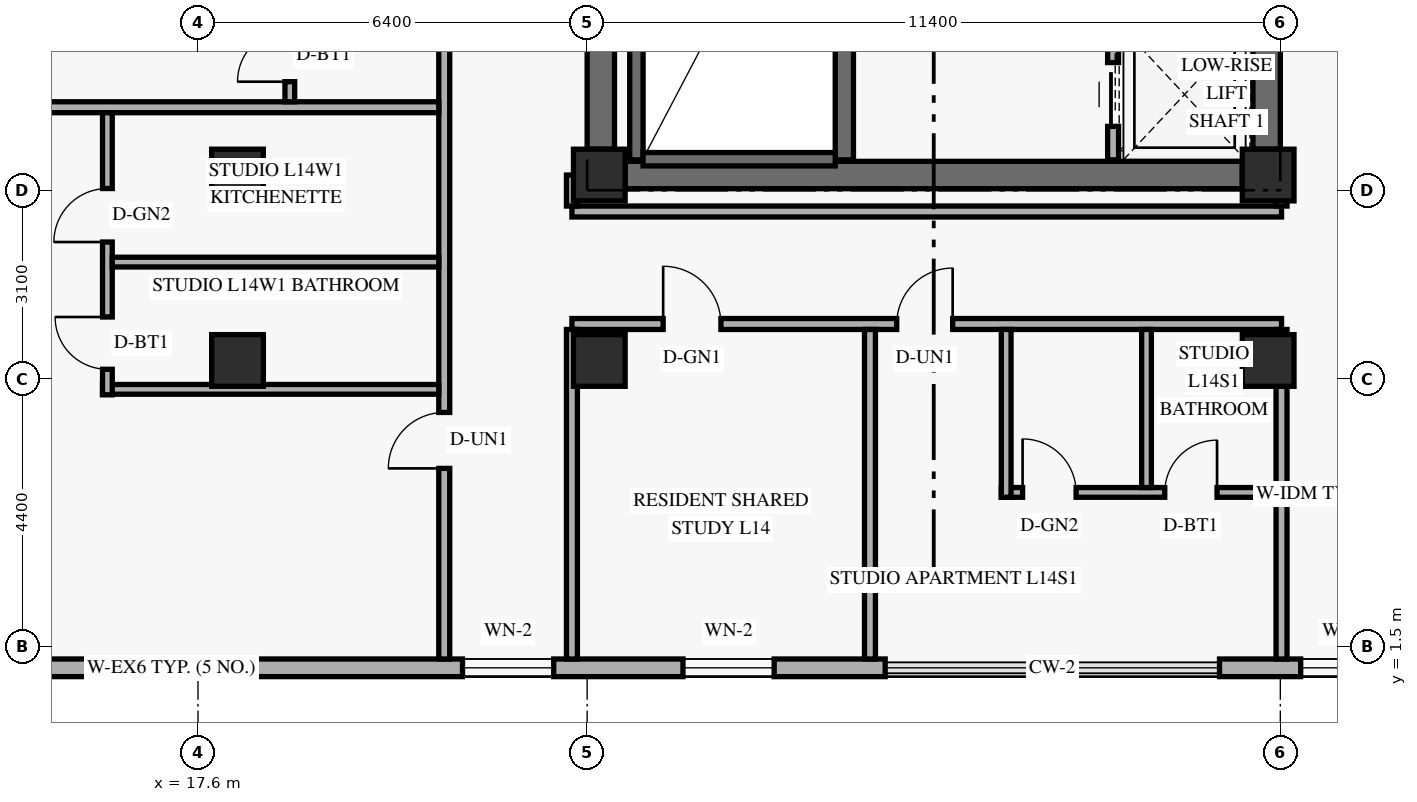
"""IFC4 building model, lengths in metres.
Left out: names, types, materials, properties, quantities, classifications, styles, units other than length and angle.
Written with IfcOpenShell. Run it as: python <this file> out.ifc"""

import sys

from ifc_helpers import new_model, si_unit, direction, frame, frame_2d, origin, origin_2d, place, context, subcontext, project, spatial, rectangle, extrude, element, fill, save


model = new_model("IFC4")
c1 = context("Model", 3, precision=1e-05, world=origin(), true_north=direction((0.0, 1.0)))
c2 = subcontext(c1, "Body", "Model", "MODEL_VIEW")
j1 = project(units=[si_unit("LENGTHUNIT", "METRE"), si_unit("PLANEANGLEUNIT", "RADIAN")], contexts=[c1])
p1 = place(None, origin())
s1 = spatial("IfcSite", under=j1, at=p1, CompositionType="ELEMENT")
p2 = place(p1, origin())
s2 = spatial("IfcBuilding", under=s1, at=p2, CompositionType="ELEMENT")
p3 = place(p2, frame((0.0, 0.0, 56.4)))
s3 = spatial("IfcBuildingStorey", under=s2, at=p3, CompositionType="ELEMENT", Elevation=56.4)
p4 = place(p3, frame((24.225, 9.675, 0.0), z_axis=(0.0, 0.0, 1.0), x_axis=(0.0, 1.0, 0.0)))
e1 = element("IfcWall", 1, at=p4, inside=s3, PredefinedType="SHEAR", context=c2, shape_type="SweptSolid", body=[
    extrude(rectangle(XDim=7.45, YDim=0.45, at=frame_2d((3.725, 0.0))), origin(), (0.0, 0.0, 1.0), 2.657),
])
p5 = place(p3, frame((35.175, 9.675, 0.0), z_axis=(0.0, 0.0, 1.0), x_axis=(0.0, 1.0, 0.0)))
e2 = element("IfcWall", 2, at=p5, inside=s3, PredefinedType="SHEAR", context=c2, shape_type="SweptSolid", body=[
    extrude(rectangle(XDim=5.875, YDim=0.45, at=frame_2d((2.938, 0.0))), origin(), (0.0, 0.0, 1.0), 2.657),
])
p6 = place(p3, frame((24.625, 9.25, 0.0), z_axis=(0.0, 0.0, 1.0), x_axis=(1.0, 0.0, 0.0)))
e3 = element("IfcWall", 3, at=p6, inside=s3, PredefinedType="SHEAR", context=c2, shape_type="SweptSolid", body=[
    extrude(rectangle(XDim=10.15, YDim=0.45, at=frame_2d((5.075, 0.0))), origin(), (0.0, 0.0, 1.0), 3.35),
])
p7 = place(p3, frame((24.81, 9.5, 0.0), z_axis=(0.0, 0.0, 1.0), x_axis=(0.0, 1.0, 0.0)))
e4 = element("IfcWall", 4, at=p7, inside=s3, PredefinedType="SHEAR", context=c2, shape_type="SweptSolid", body=[
    extrude(rectangle(XDim=7.76, YDim=0.22, at=frame_2d((3.88, 0.0))), origin(), (0.0, 0.0, 1.0), 3.35),
])
p8 = place(p3, frame((28.23, 9.5, 0.0), z_axis=(0.0, 0.0, 1.0), x_axis=(0.0, 1.0, 0.0)))
e5 = element("IfcWall", 5, at=p8, inside=s3, PredefinedType="SHEAR", context=c2, shape_type="SweptSolid", body=[
    extrude(rectangle(XDim=7.76, YDim=0.3, at=frame_2d((3.88, 0.0))), origin(), (0.0, 0.0, 1.0), 3.35),
])
p9 = place(p3, frame((24.92, 9.51, 0.0), z_axis=(0.0, 0.0, 1.0), x_axis=(1.0, 0.0, 0.0)))
e6 = element("IfcWall", 6, at=p9, inside=s3, PredefinedType="SHEAR", context=c2, shape_type="SweptSolid", body=[
    extrude(rectangle(XDim=3.16, YDim=0.22, at=frame_2d((1.58, 0.0))), origin(), (0.0, 0.0, 1.0), 3.35),
])
for number, where, z_axis, x_axis in (
    (7, (18.25, 6.2, 0.0), (0.0, 0.0, 1.0), (1.0, 0.0, 0.0)),
    (8, (18.25, 9.25, 0.0), (0.0, 0.0, 1.0), (1.0, 0.0, 0.0)),
    (9, (24.2, 6.2, 0.0), (0.0, 0.0, 1.0), (1.0, 0.0, 0.0)),
    (10, (24.2, 9.25, 0.0), (0.0, 0.0, 1.0), (1.0, 0.0, 0.0)),
    (11, (35.2, 6.2, 0.0), (0.0, 0.0, 1.0), (1.0, 0.0, 0.0)),
    (12, (35.2, 9.25, 0.0), (0.0, 0.0, 1.0), (1.0, 0.0, 0.0)),
):
    element("IfcColumn", number, at=place(p3, frame(where, z_axis=z_axis, x_axis=x_axis)), inside=s3, PredefinedType="COLUMN", context=c2, shape_type="SweptSolid", body=[
        extrude(rectangle(XDim=0.85, YDim=0.85, at=origin_2d()), origin(), (0.0, 0.0, 1.0), 3.6),
    ])
p10 = place(p3, frame((5.42, 1.145, 0.0), z_axis=(0.0, 0.0, 1.0), x_axis=(1.0, 0.0, 0.0)))
e13 = element("IfcWall", 13, at=p10, inside=s3, PredefinedType="SOLIDWALL", context=c2, shape_type="SweptSolid", body=[
    extrude(rectangle(XDim=23.481, YDim=0.29, at=frame_2d((11.741, 0.0))), origin(), (0.0, 0.0, 1.0), 3.35),
])
p11 = place(p10, frame((7.365, 0.0, 0.85)))
e14 = element("IfcOpeningElement", 14, at=p11, cuts=e13, PredefinedType="OPENING", context=c2, shape_type="SweptSolid", body=[
    extrude(rectangle(XDim=1.5, YDim=1.55, at=frame_2d((0.75, 0.775))), frame((0.0, 0.155, 0.0), z_axis=(0.0, -1.0, 0.0), x_axis=(1.0, 0.0, 0.0)), (0.0, 0.0, 1.0), 0.31),
])
p12 = place(p10, frame((16.53, 0.0, 0.85)))
e15 = element("IfcOpeningElement", 15, at=p12, cuts=e13, PredefinedType="OPENING", context=c2, shape_type="SweptSolid", body=[
    extrude(rectangle(XDim=1.5, YDim=1.55, at=frame_2d((0.75, 0.775))), frame((0.0, 0.155, 0.0), z_axis=(0.0, -1.0, 0.0), x_axis=(1.0, 0.0, 0.0)), (0.0, 0.0, 1.0), 0.31),
])
p13 = place(p10, frame((20.156, 0.0, 0.85)))
e16 = element("IfcOpeningElement", 16, at=p13, cuts=e13, PredefinedType="OPENING", context=c2, shape_type="SweptSolid", body=[
    extrude(rectangle(XDim=1.5, YDim=1.55, at=frame_2d((0.75, 0.775))), frame((0.0, 0.155, 0.0), z_axis=(0.0, -1.0, 0.0), x_axis=(1.0, 0.0, 0.0)), (0.0, 0.0, 1.0), 0.31),
])
p14 = place(p3, frame((34.4, 1.145, 0.0), z_axis=(0.0, 0.0, 1.0), x_axis=(1.0, 0.0, 0.0)))
e17 = element("IfcWall", 17, at=p14, inside=s3, PredefinedType="SOLIDWALL", context=c2, shape_type="SweptSolid", body=[
    extrude(rectangle(XDim=10.58, YDim=0.29, at=frame_2d((5.29, 0.0))), origin(), (0.0, 0.0, 1.0), 3.35),
])
p15 = place(p14, frame((1.335, 0.0, 0.85)))
e18 = element("IfcOpeningElement", 18, at=p15, cuts=e17, PredefinedType="OPENING", context=c2, shape_type="SweptSolid", body=[
    extrude(rectangle(XDim=1.5, YDim=1.55, at=frame_2d((0.75, 0.775))), frame((0.0, 0.155, 0.0), z_axis=(0.0, -1.0, 0.0), x_axis=(1.0, 0.0, 0.0)), (0.0, 0.0, 1.0), 0.31),
])
p16 = place(p14, frame((6.115, 0.0, 0.85)))
e19 = element("IfcOpeningElement", 19, at=p16, cuts=e17, PredefinedType="OPENING", context=c2, shape_type="SweptSolid", body=[
    extrude(rectangle(XDim=1.5, YDim=1.55, at=frame_2d((0.75, 0.775))), frame((0.0, 0.155, 0.0), z_axis=(0.0, -1.0, 0.0), x_axis=(1.0, 0.0, 0.0)), (0.0, 0.0, 1.0), 0.31),
])
p17 = place(p3, frame((32.65, 9.5, 0.0), z_axis=(0.0, 0.0, 1.0), x_axis=(0.0, 1.0, 0.0)))
e20 = element("IfcWall", 20, at=p17, inside=s3, PredefinedType="STANDARD", context=c2, shape_type="SweptSolid", body=[
    extrude(rectangle(XDim=6.08, YDim=0.18, at=frame_2d((3.04, 0.0))), origin(), (0.0, 0.0, 1.0), 3.35),
])
p18 = place(p17, frame((0.55, 0.0, 0.0)))
e21 = element("IfcOpeningElement", 21, at=p18, cuts=e20, PredefinedType="OPENING", context=c2, shape_type="SweptSolid", body=[
    extrude(rectangle(XDim=1.05, YDim=2.2, at=frame_2d((0.525, 1.1))), frame((0.0, 0.1, 0.0), z_axis=(0.0, -1.0, 0.0), x_axis=(1.0, 0.0, 0.0)), (0.0, 0.0, 1.0), 0.2),
])
p19 = place(p17, frame((2.55, 0.0, 0.0)))
e22 = element("IfcOpeningElement", 22, at=p19, cuts=e20, PredefinedType="OPENING", context=c2, shape_type="SweptSolid", body=[
    extrude(rectangle(XDim=1.05, YDim=2.2, at=frame_2d((0.525, 1.1))), frame((0.0, 0.1, 0.0), z_axis=(0.0, -1.0, 0.0), x_axis=(1.0, 0.0, 0.0)), (0.0, 0.0, 1.0), 0.2),
])
p20 = place(p17, frame((4.55, 0.0, 0.0)))
e23 = element("IfcOpeningElement", 23, at=p20, cuts=e20, PredefinedType="OPENING", context=c2, shape_type="SweptSolid", body=[
    extrude(rectangle(XDim=1.05, YDim=2.2, at=frame_2d((0.525, 1.1))), frame((0.0, 0.1, 0.0), z_axis=(0.0, -1.0, 0.0), x_axis=(1.0, 0.0, 0.0)), (0.0, 0.0, 1.0), 0.2),
])
p21 = place(p3, frame((21.65, 1.29, 0.0), z_axis=(0.0, 0.0, 1.0), x_axis=(0.0, 1.0, 0.0)))
e24 = element("IfcWall", 24, at=p21, inside=s3, PredefinedType="STANDARD", context=c2, shape_type="SweptSolid", body=[
    extrude(rectangle(XDim=45.42, YDim=0.18, at=frame_2d((22.71, 0.0))), origin(), (0.0, 0.0, 1.0), 2.639),
])
p22 = place(p21, frame((3.135, 0.0, 0.0)))
e25 = element("IfcOpeningElement", 25, at=p22, cuts=e24, PredefinedType="OPENING", context=c2, shape_type="SweptSolid", body=[
    extrude(rectangle(XDim=0.92, YDim=2.15, at=frame_2d((0.46, 1.075))), frame((0.0, 0.1, 0.0), z_axis=(0.0, -1.0, 0.0), x_axis=(1.0, 0.0, 0.0)), (0.0, 0.0, 1.0), 0.2),
])
p23 = place(p21, frame((13.975, 0.0, 0.0)))
e26 = element("IfcOpeningElement", 26, at=p23, cuts=e24, PredefinedType="OPENING", context=c2, shape_type="SweptSolid", body=[
    extrude(rectangle(XDim=0.92, YDim=2.15, at=frame_2d((0.46, 1.075))), frame((0.0, 0.1, 0.0), z_axis=(0.0, -1.0, 0.0), x_axis=(1.0, 0.0, 0.0)), (0.0, 0.0, 1.0), 0.2),
])
p24 = place(p21, frame((20.91, 0.0, 0.0)))
e27 = element("IfcOpeningElement", 27, at=p24, cuts=e24, PredefinedType="OPENING", context=c2, shape_type="SweptSolid", body=[
    extrude(rectangle(XDim=0.95, YDim=2.15, at=frame_2d((0.475, 1.075))), frame((0.0, 0.1, 0.0), z_axis=(0.0, -1.0, 0.0), x_axis=(1.0, 0.0, 0.0)), (0.0, 0.0, 1.0), 0.2),
])
p25 = place(p21, frame((32.95, 0.0, 0.0)))
e28 = element("IfcOpeningElement", 28, at=p25, cuts=e24, PredefinedType="OPENING", context=c2, shape_type="SweptSolid", body=[
    extrude(rectangle(XDim=0.92, YDim=2.15, at=frame_2d((0.46, 1.075))), frame((0.0, 0.1, 0.0), z_axis=(0.0, -1.0, 0.0), x_axis=(1.0, 0.0, 0.0)), (0.0, 0.0, 1.0), 0.2),
])
p26 = place(p21, frame((41.85, 0.0, 0.0)))
e29 = element("IfcOpeningElement", 29, at=p26, cuts=e24, PredefinedType="OPENING", context=c2, shape_type="SweptSolid", body=[
    extrude(rectangle(XDim=0.92, YDim=2.15, at=frame_2d((0.46, 1.075))), frame((0.0, 0.1, 0.0), z_axis=(0.0, -1.0, 0.0), x_axis=(1.0, 0.0, 0.0)), (0.0, 0.0, 1.0), 0.2),
])
p27 = place(p3, frame((23.75, 6.8, 0.0), z_axis=(0.0, 0.0, 1.0), x_axis=(1.0, 0.0, 0.0)))
e30 = element("IfcWall", 30, at=p27, inside=s3, PredefinedType="STANDARD", context=c2, shape_type="SweptSolid", body=[
    extrude(rectangle(XDim=11.67, YDim=0.18, at=frame_2d((5.835, 0.0))), origin(), (0.0, 0.0, 1.0), 2.639),
])
p28 = place(p27, frame((1.5, 0.0, 0.0)))
e31 = element("IfcOpeningElement", 31, at=p28, cuts=e30, PredefinedType="OPENING", context=c2, shape_type="SweptSolid", body=[
    extrude(rectangle(XDim=0.95, YDim=2.15, at=frame_2d((0.475, 1.075))), frame((0.0, 0.1, 0.0), z_axis=(0.0, -1.0, 0.0), x_axis=(1.0, 0.0, 0.0)), (0.0, 0.0, 1.0), 0.2),
])
p29 = place(p27, frame((5.341, 0.0, 0.0)))
e32 = element("IfcOpeningElement", 32, at=p29, cuts=e30, PredefinedType="OPENING", context=c2, shape_type="SweptSolid", body=[
    extrude(rectangle(XDim=0.92, YDim=2.15, at=frame_2d((0.46, 1.075))), frame((0.0, 0.1, 0.0), z_axis=(0.0, -1.0, 0.0), x_axis=(1.0, 0.0, 0.0)), (0.0, 0.0, 1.0), 0.2),
])
p30 = place(p3, frame((23.75, 8.65, 0.0), z_axis=(0.0, 0.0, 1.0), x_axis=(1.0, 0.0, 0.0)))
e33 = element("IfcWall", 33, at=p30, inside=s3, PredefinedType="STANDARD", context=c2, shape_type="SweptSolid", body=[
    extrude(rectangle(XDim=11.67, YDim=0.18, at=frame_2d((5.835, 0.0))), origin(), (0.0, 0.0, 1.0), 2.639),
])
p31 = place(p3, frame((35.42, 1.29, 0.0), z_axis=(0.0, 0.0, 1.0), x_axis=(0.0, 1.0, 0.0)))
e34 = element("IfcWall", 34, at=p31, inside=s3, PredefinedType="PARTITIONING", context=c2, shape_type="SweptSolid", body=[
    extrude(rectangle(XDim=5.42, YDim=0.18, at=frame_2d((2.71, 0.0))), origin(), (0.0, 0.0, 1.0), 3.35),
])
p32 = place(p3, frame((35.42, 8.74, 0.0), z_axis=(0.0, 0.0, 1.0), x_axis=(0.0, 1.0, 0.0)))
e35 = element("IfcWall", 35, at=p32, inside=s3, PredefinedType="STANDARD", context=c2, shape_type="SweptSolid", body=[
    extrude(rectangle(XDim=0.51, YDim=0.18, at=frame_2d((0.255, 0.0))), origin(), (0.0, 0.0, 1.0), 3.35),
])
p33 = place(p3, frame((23.75, 8.74, 0.0), z_axis=(0.0, 0.0, 1.0), x_axis=(0.0, 1.0, 0.0)))
e36 = element("IfcWall", 36, at=p33, inside=s3, PredefinedType="STANDARD", context=c2, shape_type="SweptSolid", body=[
    extrude(rectangle(XDim=0.51, YDim=0.18, at=frame_2d((0.255, 0.0))), origin(), (0.0, 0.0, 1.0), 2.639),
])
p34 = place(p3, frame((2.09, 10.365, 0.0), z_axis=(0.0, 0.0, 1.0), x_axis=(1.0, 0.0, 0.0)))
e37 = element("IfcWall", 37, at=p34, inside=s3, PredefinedType="PARTITIONING", context=c2, shape_type="SweptSolid", body=[
    extrude(rectangle(XDim=19.47, YDim=0.18, at=frame_2d((9.735, 0.0))), origin(), (0.0, 0.0, 1.0), 2.639),
])
p35 = place(p3, frame((16.03, 5.725, 0.0), z_axis=(0.0, 0.0, 1.0), x_axis=(1.0, 0.0, 0.0)))
e38 = element("IfcWall", 38, at=p35, inside=s3, PredefinedType="PLUMBINGWALL", context=c2, shape_type="SweptSolid", body=[
    extrude(rectangle(XDim=5.53, YDim=0.16, at=frame_2d((2.765, 0.0))), origin(), (0.0, 0.0, 1.0), 3.35),
])
p36 = place(p3, frame((16.11, 5.635, 0.0), z_axis=(0.0, 0.0, 1.0), x_axis=(0.0, 1.0, 0.0)))
e39 = element("IfcWall", 39, at=p36, inside=s3, PredefinedType="PLUMBINGWALL", context=c2, shape_type="SweptSolid", body=[
    extrude(rectangle(XDim=4.64, YDim=0.16, at=frame_2d((2.32, 0.0))), origin(), (0.0, 0.0, 1.0), 2.639),
])
p37 = place(p36, frame((0.42, 0.0, 0.0)))
e40 = element("IfcOpeningElement", 40, at=p37, cuts=e39, PredefinedType="OPENING", context=c2, shape_type="SweptSolid", body=[
    extrude(rectangle(XDim=0.86, YDim=2.12, at=frame_2d((0.43, 1.06))), frame((0.0, 0.09, 0.0), z_axis=(0.0, -1.0, 0.0), x_axis=(1.0, 0.0, 0.0)), (0.0, 0.0, 1.0), 0.18),
])
p38 = place(p36, frame((2.513, 0.0, 0.0)))
e41 = element("IfcOpeningElement", 41, at=p38, cuts=e39, PredefinedType="OPENING", context=c2, shape_type="SweptSolid", body=[
    extrude(rectangle(XDim=0.88, YDim=2.12, at=frame_2d((0.44, 1.06))), frame((0.0, 0.09, 0.0), z_axis=(0.0, -1.0, 0.0), x_axis=(1.0, 0.0, 0.0)), (0.0, 0.0, 1.0), 0.18),
])
p39 = place(p3, frame((16.19, 7.818, 0.0), z_axis=(0.0, 0.0, 1.0), x_axis=(1.0, 0.0, 0.0)))
e42 = element("IfcWall", 42, at=p39, inside=s3, PredefinedType="PLUMBINGWALL", context=c2, shape_type="SweptSolid", body=[
    extrude(rectangle(XDim=5.37, YDim=0.16, at=frame_2d((2.685, 0.0))), origin(), (0.0, 0.0, 1.0), 2.639),
])
p40 = place(p3, frame((19.11, 10.455, 0.0), z_axis=(0.0, 0.0, 1.0), x_axis=(0.0, 1.0, 0.0)))
e43 = element("IfcWall", 43, at=p40, inside=s3, PredefinedType="PLUMBINGWALL", context=c2, shape_type="SweptSolid", body=[
    extrude(rectangle(XDim=4.54, YDim=0.16, at=frame_2d((2.27, 0.0))), origin(), (0.0, 0.0, 1.0), 2.922),
])
p41 = place(p40, frame((0.33, 0.0, 0.0)))
e44 = element("IfcOpeningElement", 44, at=p41, cuts=e43, PredefinedType="OPENING", context=c2, shape_type="SweptSolid", body=[
    extrude(rectangle(XDim=0.86, YDim=2.12, at=frame_2d((0.43, 1.06))), frame((0.0, 0.09, 0.0), z_axis=(0.0, -1.0, 0.0), x_axis=(1.0, 0.0, 0.0)), (0.0, 0.0, 1.0), 0.18),
])
p42 = place(p40, frame((2.377, 0.0, 0.0)))
e45 = element("IfcOpeningElement", 45, at=p42, cuts=e43, PredefinedType="OPENING", context=c2, shape_type="SweptSolid", body=[
    extrude(rectangle(XDim=0.88, YDim=2.12, at=frame_2d((0.44, 1.06))), frame((0.0, 0.09, 0.0), z_axis=(0.0, -1.0, 0.0), x_axis=(1.0, 0.0, 0.0)), (0.0, 0.0, 1.0), 0.18),
])
for number, where, z_axis, x_axis in (
    (46, (23.75, 1.29, 0.0), (0.0, 0.0, 1.0), (0.0, 1.0, 0.0)),
    (47, (28.651, 1.29, 0.0), (0.0, 0.0, 1.0), (0.0, 1.0, 0.0)),
):
    element("IfcWall", number, at=place(p3, frame(where, z_axis=z_axis, x_axis=x_axis)), inside=s3, PredefinedType="PARTITIONING", context=c2, shape_type="SweptSolid", body=[
        extrude(rectangle(XDim=5.42, YDim=0.18, at=frame_2d((2.71, 0.0))), origin(), (0.0, 0.0, 1.0), 2.799),
    ])
p43 = place(p3, frame((30.811, 4.03, 0.0), z_axis=(0.0, 0.0, 1.0), x_axis=(1.0, 0.0, 0.0)))
e48 = element("IfcWall", 48, at=p43, inside=s3, PredefinedType="PLUMBINGWALL", context=c2, shape_type="SweptSolid", body=[
    extrude(rectangle(XDim=4.519, YDim=0.16, at=frame_2d((2.259, 0.0))), origin(), (0.0, 0.0, 1.0), 3.35),
])
p44 = place(p43, frame((0.35, 0.0, 0.0)))
e49 = element("IfcOpeningElement", 49, at=p44, cuts=e48, PredefinedType="OPENING", context=c2, shape_type="SweptSolid", body=[
    extrude(rectangle(XDim=0.88, YDim=2.12, at=frame_2d((0.44, 1.06))), frame((0.0, 0.09, 0.0), z_axis=(0.0, -1.0, 0.0), x_axis=(1.0, 0.0, 0.0)), (0.0, 0.0, 1.0), 0.18),
])
p45 = place(p43, frame((2.688, 0.0, 0.0)))
e50 = element("IfcOpeningElement", 50, at=p45, cuts=e48, PredefinedType="OPENING", context=c2, shape_type="SweptSolid", body=[
    extrude(rectangle(XDim=0.86, YDim=2.12, at=frame_2d((0.43, 1.06))), frame((0.0, 0.09, 0.0), z_axis=(0.0, -1.0, 0.0), x_axis=(1.0, 0.0, 0.0)), (0.0, 0.0, 1.0), 0.18),
])
p46 = place(p3, frame((30.891, 3.95, 0.0), z_axis=(0.0, 0.0, 1.0), x_axis=(0.0, 1.0, 0.0)))
e51 = element("IfcWall", 51, at=p46, inside=s3, PredefinedType="PLUMBINGWALL", context=c2, shape_type="SweptSolid", body=[
    extrude(rectangle(XDim=2.76, YDim=0.16, at=frame_2d((1.38, 0.0))), origin(), (0.0, 0.0, 1.0), 2.799),
])
p47 = place(p3, frame((33.199, 4.11, 0.0), z_axis=(0.0, 0.0, 1.0), x_axis=(0.0, 1.0, 0.0)))
e52 = element("IfcWall", 52, at=p47, inside=s3, PredefinedType="PLUMBINGWALL", context=c2, shape_type="SweptSolid", body=[
    extrude(rectangle(XDim=2.6, YDim=0.16, at=frame_2d((1.3, 0.0))), origin(), (0.0, 0.0, 1.0), 2.799),
])
p48 = place(p12, origin())
e53 = element("IfcWindow", 53, at=p48, inside=s3, PartitioningType="SINGLE_PANEL", PredefinedType="WINDOW", context=c2, shape_type="SweptSolid", body=[
    extrude(rectangle(XDim=1.5, YDim=1.55, at=frame_2d((0.75, 0.775))), frame((0.0, 0.03, 0.0), z_axis=(0.0, -1.0, 0.0), x_axis=(1.0, 0.0, 0.0)), (0.0, 0.0, 1.0), 0.06),
])
fill(e15, e53)
p49 = place(p13, origin())
e54 = element("IfcWindow", 54, at=p49, inside=s3, PartitioningType="SINGLE_PANEL", PredefinedType="WINDOW", context=c2, shape_type="SweptSolid", body=[
    extrude(rectangle(XDim=1.5, YDim=1.55, at=frame_2d((0.75, 0.775))), frame((0.0, 0.03, 0.0), z_axis=(0.0, -1.0, 0.0), x_axis=(1.0, 0.0, 0.0)), (0.0, 0.0, 1.0), 0.06),
])
fill(e16, e54)
p50 = place(p15, origin())
e55 = element("IfcWindow", 55, at=p50, inside=s3, PartitioningType="SINGLE_PANEL", PredefinedType="WINDOW", context=c2, shape_type="SweptSolid", body=[
    extrude(rectangle(XDim=1.5, YDim=1.55, at=frame_2d((0.75, 0.775))), frame((0.0, 0.03, 0.0), z_axis=(0.0, -1.0, 0.0), x_axis=(1.0, 0.0, 0.0)), (0.0, 0.0, 1.0), 0.06),
])
fill(e18, e55)
p51 = place(p18, origin())
e56 = element("IfcDoor", 56, at=p51, inside=s3, OperationType="SLIDING_TO_LEFT", PredefinedType="DOOR", context=c2, shape_type="SweptSolid", body=[
    extrude(rectangle(XDim=1.05, YDim=2.2, at=frame_2d((0.525, 1.1))), frame((0.0, 0.025, 0.0), z_axis=(0.0, -1.0, 0.0), x_axis=(1.0, 0.0, 0.0)), (0.0, 0.0, 1.0), 0.05),
])
fill(e21, e56)
p52 = place(p22, origin())
e57 = element("IfcDoor", 57, at=p52, inside=s3, OperationType="SINGLE_SWING_LEFT", PredefinedType="DOOR", context=c2, shape_type="SweptSolid", body=[
    extrude(rectangle(XDim=0.92, YDim=2.15, at=frame_2d((0.46, 1.075))), frame((0.0, 0.025, 0.0), z_axis=(0.0, -1.0, 0.0), x_axis=(1.0, 0.0, 0.0)), (0.0, 0.0, 1.0), 0.05),
])
fill(e25, e57)
p53 = place(p37, origin())
e58 = element("IfcDoor", 58, at=p53, inside=s3, OperationType="SINGLE_SWING_RIGHT", PredefinedType="DOOR", context=c2, shape_type="SweptSolid", body=[
    extrude(rectangle(XDim=0.86, YDim=2.12, at=frame_2d((0.43, 1.06))), frame((0.0, 0.025, 0.0), z_axis=(0.0, -1.0, 0.0), x_axis=(1.0, 0.0, 0.0)), (0.0, 0.0, 1.0), 0.05),
])
fill(e40, e58)
p54 = place(p38, origin())
e59 = element("IfcDoor", 59, at=p54, inside=s3, OperationType="SINGLE_SWING_LEFT", PredefinedType="DOOR", context=c2, shape_type="SweptSolid", body=[
    extrude(rectangle(XDim=0.88, YDim=2.12, at=frame_2d((0.44, 1.06))), frame((0.0, 0.025, 0.0), z_axis=(0.0, -1.0, 0.0), x_axis=(1.0, 0.0, 0.0)), (0.0, 0.0, 1.0), 0.05),
])
fill(e41, e59)
p55 = place(p41, origin())
e60 = element("IfcDoor", 60, at=p55, inside=s3, OperationType="SINGLE_SWING_LEFT", PredefinedType="DOOR", context=c2, shape_type="SweptSolid", body=[
    extrude(rectangle(XDim=0.86, YDim=2.12, at=frame_2d((0.43, 1.06))), frame((0.0, 0.025, 0.0), z_axis=(0.0, -1.0, 0.0), x_axis=(1.0, 0.0, 0.0)), (0.0, 0.0, 1.0), 0.05),
])
fill(e44, e60)
p56 = place(p28, origin())
e61 = element("IfcDoor", 61, at=p56, inside=s3, OperationType="SINGLE_SWING_LEFT", PredefinedType="DOOR", context=c2, shape_type="SweptSolid", body=[
    extrude(rectangle(XDim=0.95, YDim=2.15, at=frame_2d((0.475, 1.075))), frame((0.0, 0.025, 0.0), z_axis=(0.0, -1.0, 0.0), x_axis=(1.0, 0.0, 0.0)), (0.0, 0.0, 1.0), 0.05),
])
fill(e31, e61)
p57 = place(p29, origin())
e62 = element("IfcDoor", 62, at=p57, inside=s3, OperationType="SINGLE_SWING_RIGHT", PredefinedType="DOOR", context=c2, shape_type="SweptSolid", body=[
    extrude(rectangle(XDim=0.92, YDim=2.15, at=frame_2d((0.46, 1.075))), frame((0.0, 0.025, 0.0), z_axis=(0.0, -1.0, 0.0), x_axis=(1.0, 0.0, 0.0)), (0.0, 0.0, 1.0), 0.05),
])
fill(e32, e62)
p58 = place(p44, origin())
e63 = element("IfcDoor", 63, at=p58, inside=s3, OperationType="SINGLE_SWING_LEFT", PredefinedType="DOOR", context=c2, shape_type="SweptSolid", body=[
    extrude(rectangle(XDim=0.88, YDim=2.12, at=frame_2d((0.44, 1.06))), frame((0.0, 0.025, 0.0), z_axis=(0.0, -1.0, 0.0), x_axis=(1.0, 0.0, 0.0)), (0.0, 0.0, 1.0), 0.05),
])
fill(e49, e63)
p59 = place(p45, origin())
e64 = element("IfcDoor", 64, at=p59, inside=s3, OperationType="SINGLE_SWING_RIGHT", PredefinedType="DOOR", context=c2, shape_type="SweptSolid", body=[
    extrude(rectangle(XDim=0.86, YDim=2.12, at=frame_2d((0.43, 1.06))), frame((0.0, 0.025, 0.0), z_axis=(0.0, -1.0, 0.0), x_axis=(1.0, 0.0, 0.0)), (0.0, 0.0, 1.0), 0.05),
])
fill(e50, e64)
save(model, sys.argv[1])
